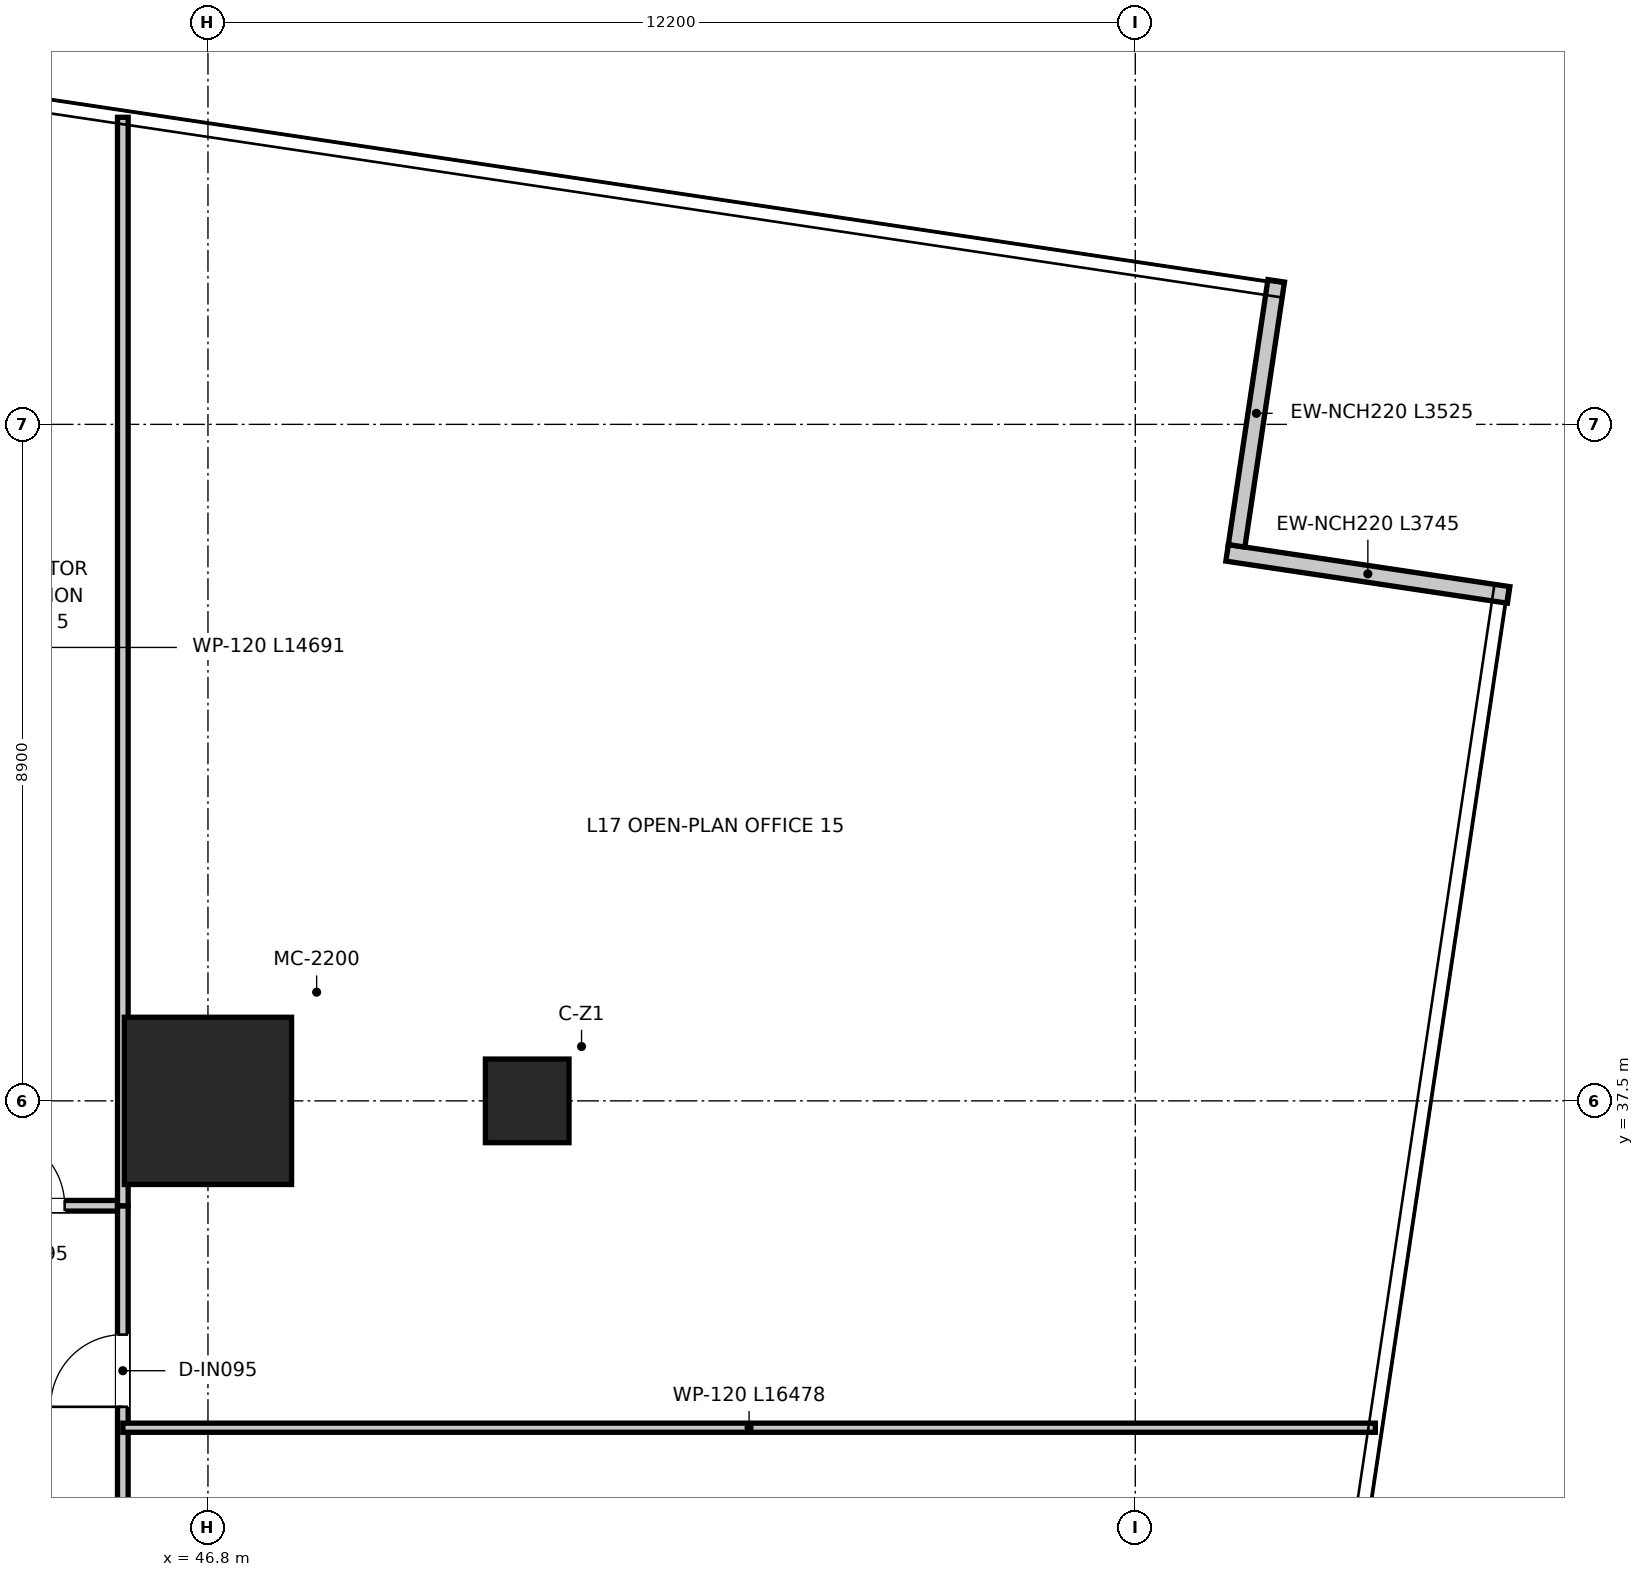
"""IFC4 building model, lengths in metres.
Left out: names, types, materials, properties, quantities, classifications, styles, units other than length and angle.
Written with IfcOpenShell. Run it as: python <this file> out.ifc"""

import sys

from ifc_helpers import new_model, si_unit, direction, frame, frame_2d, origin, origin_2d, place, context, subcontext, project, spatial, rectangle, extrude, source, transform, mapped, element, fill, save


model = new_model("IFC4")
c1 = context("Model", 3, precision=1e-05, world=origin(), true_north=direction((0.0, 1.0)))
c2 = subcontext(c1, "Body", "Model", "MODEL_VIEW")
j1 = project(units=[si_unit("LENGTHUNIT", "METRE"), si_unit("PLANEANGLEUNIT", "RADIAN")], contexts=[c1])
p1 = place(None, origin())
s1 = spatial("IfcSite", under=j1, at=p1, CompositionType="ELEMENT")
p2 = place(p1, origin())
s2 = spatial("IfcBuilding", under=s1, at=p2, CompositionType="ELEMENT")
p3 = place(p2, frame((0.0, 0.0, 72.4)))
s3 = spatial("IfcBuildingStorey", under=s2, at=p3, CompositionType="ELEMENT", Elevation=72.4)
m1 = source(origin(), c2, "Body", "SweptSolid", [
    extrude(rectangle(XDim=2.2, YDim=2.2, at=origin_2d()), origin(), (0.0, 0.0, 1.0), 3.95),
])
p4 = place(p3, frame((46.8, 37.5, 0.0), z_axis=(0.0, 0.0, 1.0), x_axis=(1.0, 0.0, 0.0)))
e1 = element("IfcColumn", 1, at=p4, inside=s3, PredefinedType="USERDEFINED", context=c2, shape_type="MappedRepresentation", body=[
    mapped(m1, transform((0.0, 0.0, 0.0), x_axis=(1.0, 0.0, 0.0), y_axis=(0.0, 1.0, 0.0), z_axis=(0.0, 0.0, 1.0), scale=1.0)),
])
m2 = source(origin(), c2, "Body", "SweptSolid", [
    extrude(rectangle(XDim=1.1, YDim=1.1, at=origin_2d()), origin(), (0.0, 0.0, 1.0), 3.95),
])
p5 = place(p3, frame((51.0, 37.5, 0.0), z_axis=(0.0, 0.0, 1.0), x_axis=(1.0, 0.0, 0.0)))
e2 = element("IfcColumn", 2, at=p5, inside=s3, PredefinedType="COLUMN", context=c2, shape_type="MappedRepresentation", body=[
    mapped(m2, transform((0.0, 0.0, 0.0), x_axis=(1.0, 0.0, 0.0), y_axis=(0.0, 1.0, 0.0), z_axis=(0.0, 0.0, 1.0), scale=1.0)),
])
p6 = place(p3, frame((63.912, 44.156, 0.0), z_axis=(0.0, 0.0, 1.0), x_axis=(-0.989009392913, 0.147852699435, 0.0)))
e3 = element("IfcWall", 3, at=p6, inside=s3, PredefinedType="ELEMENTEDWALL", context=c2, shape_type="SweptSolid", body=[
    extrude(rectangle(XDim=3.745, YDim=0.22, at=frame_2d((1.873, 0.0))), origin(), (0.0, 0.0, 1.0), 3.67),
])
p7 = place(p3, frame((60.333, 44.802, 0.0), z_axis=(0.0, 0.0, 1.0), x_axis=(0.147798551521, 0.98901748628, 0.0)))
e4 = element("IfcWall", 4, at=p7, inside=s3, PredefinedType="ELEMENTEDWALL", context=c2, shape_type="SweptSolid", body=[
    extrude(rectangle(XDim=3.525, YDim=0.22, at=frame_2d((1.763, 0.0))), origin(), (0.0, 0.0, 1.0), 3.67),
])
p8 = place(p3, frame((26.32, 36.12, 0.0), z_axis=(0.0, 0.0, 1.0), x_axis=(1.0, 0.0, 0.0)))
e5 = element("IfcWall", 5, at=p8, inside=s3, PredefinedType="PARTITIONING", context=c2, shape_type="SweptSolid", body=[
    extrude(rectangle(XDim=19.36, YDim=0.14, at=frame_2d((9.68, 0.0))), origin(), (0.0, 0.0, 1.0), 3.08),
])
p9 = place(p8, frame((1.265, 0.0, 0.0)))
e6 = element("IfcOpeningElement", 6, at=p9, cuts=e5, PredefinedType="OPENING", context=c2, shape_type="SweptSolid", body=[
    extrude(rectangle(XDim=0.95, YDim=2.1, at=frame_2d((0.475, 1.05))), frame((0.0, 0.08, 0.0), z_axis=(0.0, -1.0, 0.0), x_axis=(1.0, 0.0, 0.0)), (0.0, 0.0, 1.0), 0.16),
])
p10 = place(p8, frame((5.305, 0.0, 0.0)))
e7 = element("IfcOpeningElement", 7, at=p10, cuts=e5, PredefinedType="OPENING", context=c2, shape_type="SweptSolid", body=[
    extrude(rectangle(XDim=0.95, YDim=2.1, at=frame_2d((0.475, 1.05))), frame((0.0, 0.08, 0.0), z_axis=(0.0, -1.0, 0.0), x_axis=(1.0, 0.0, 0.0)), (0.0, 0.0, 1.0), 0.16),
])
p11 = place(p8, frame((9.905, 0.0, 0.0)))
e8 = element("IfcOpeningElement", 8, at=p11, cuts=e5, PredefinedType="OPENING", context=c2, shape_type="SweptSolid", body=[
    extrude(rectangle(XDim=0.95, YDim=2.1, at=frame_2d((0.475, 1.05))), frame((0.0, 0.08, 0.0), z_axis=(0.0, -1.0, 0.0), x_axis=(1.0, 0.0, 0.0)), (0.0, 0.0, 1.0), 0.16),
])
p12 = place(p8, frame((14.305, 0.0, 0.0)))
e9 = element("IfcOpeningElement", 9, at=p12, cuts=e5, PredefinedType="OPENING", context=c2, shape_type="SweptSolid", body=[
    extrude(rectangle(XDim=0.95, YDim=2.1, at=frame_2d((0.475, 1.05))), frame((0.0, 0.08, 0.0), z_axis=(0.0, -1.0, 0.0), x_axis=(1.0, 0.0, 0.0)), (0.0, 0.0, 1.0), 0.16),
])
p13 = place(p8, frame((17.645, 0.0, 0.0)))
e10 = element("IfcOpeningElement", 10, at=p13, cuts=e5, PredefinedType="OPENING", context=c2, shape_type="SweptSolid", body=[
    extrude(rectangle(XDim=0.95, YDim=2.1, at=frame_2d((0.475, 1.05))), frame((0.0, 0.08, 0.0), z_axis=(0.0, -1.0, 0.0), x_axis=(1.0, 0.0, 0.0)), (0.0, 0.0, 1.0), 0.16),
])
p14 = place(p3, frame((45.68, 10.5, 0.0), z_axis=(0.0, 0.0, 1.0), x_axis=(0.0, 1.0, 0.0)))
e11 = element("IfcWall", 11, at=p14, inside=s3, PredefinedType="PARTITIONING", context=c2, shape_type="SweptSolid", body=[
    extrude(rectangle(XDim=25.62, YDim=0.14, at=frame_2d((12.81, 0.0))), origin(), (0.0, 0.0, 1.0), 2.97),
])
p15 = place(p14, frame((7.775, 0.0, 0.0)))
e12 = element("IfcOpeningElement", 12, at=p15, cuts=e11, PredefinedType="OPENING", context=c2, shape_type="SweptSolid", body=[
    extrude(rectangle(XDim=0.95, YDim=2.1, at=frame_2d((0.475, 1.05))), frame((0.0, 0.08, 0.0), z_axis=(0.0, -1.0, 0.0), x_axis=(1.0, 0.0, 0.0)), (0.0, 0.0, 1.0), 0.16),
])
p16 = place(p14, frame((11.275, 0.0, 0.0)))
e13 = element("IfcOpeningElement", 13, at=p16, cuts=e11, PredefinedType="OPENING", context=c2, shape_type="SweptSolid", body=[
    extrude(rectangle(XDim=0.95, YDim=2.1, at=frame_2d((0.475, 1.05))), frame((0.0, 0.08, 0.0), z_axis=(0.0, -1.0, 0.0), x_axis=(1.0, 0.0, 0.0)), (0.0, 0.0, 1.0), 0.16),
])
p17 = place(p14, frame((15.775, 0.0, 0.0)))
e14 = element("IfcOpeningElement", 14, at=p17, cuts=e11, PredefinedType="OPENING", context=c2, shape_type="SweptSolid", body=[
    extrude(rectangle(XDim=0.95, YDim=2.1, at=frame_2d((0.475, 1.05))), frame((0.0, 0.08, 0.0), z_axis=(0.0, -1.0, 0.0), x_axis=(1.0, 0.0, 0.0)), (0.0, 0.0, 1.0), 0.16),
])
p18 = place(p14, frame((20.125, 0.0, 0.0)))
e15 = element("IfcOpeningElement", 15, at=p18, cuts=e11, PredefinedType="OPENING", context=c2, shape_type="SweptSolid", body=[
    extrude(rectangle(XDim=0.95, YDim=2.1, at=frame_2d((0.475, 1.05))), frame((0.0, 0.08, 0.0), z_axis=(0.0, -1.0, 0.0), x_axis=(1.0, 0.0, 0.0)), (0.0, 0.0, 1.0), 0.16),
])
p19 = place(p14, frame((22.975, 0.0, 0.0)))
e16 = element("IfcOpeningElement", 16, at=p19, cuts=e11, PredefinedType="OPENING", context=c2, shape_type="SweptSolid", body=[
    extrude(rectangle(XDim=0.95, YDim=2.1, at=frame_2d((0.475, 1.05))), frame((0.0, 0.08, 0.0), z_axis=(0.0, -1.0, 0.0), x_axis=(1.0, 0.0, 0.0)), (0.0, 0.0, 1.0), 0.16),
])
p20 = place(p3, frame((45.68, 36.12, 0.0), z_axis=(0.0, 0.0, 1.0), x_axis=(0.0, 1.0, 0.0)))
e17 = element("IfcWall", 17, at=p20, inside=s3, PredefinedType="PARTITIONING", context=c2, shape_type="SweptSolid", body=[
    extrude(rectangle(XDim=14.32, YDim=0.14, at=frame_2d((7.16, 0.0))), origin(), (0.0, 0.0, 1.0), 2.97),
])
p21 = place(p3, frame((45.68, 33.2, 0.0), z_axis=(0.0, 0.0, 1.0), x_axis=(1.0, 0.0, 0.0)))
e18 = element("IfcWall", 18, at=p21, inside=s3, PredefinedType="PARTITIONING", context=c2, shape_type="SweptSolid", body=[
    extrude(rectangle(XDim=16.478, YDim=0.12, at=frame_2d((8.239, 0.0))), origin(), (0.0, 0.0, 1.0), 2.97),
])
p22 = place(p13, origin())
e19 = element("IfcDoor", 19, at=p22, inside=s3, OperationType="SINGLE_SWING_LEFT", PredefinedType="DOOR", context=c2, shape_type="SweptSolid", body=[
    extrude(rectangle(XDim=0.95, YDim=2.1, at=frame_2d((0.475, 1.05))), frame((0.0, 0.025, 0.0), z_axis=(0.0, -1.0, 0.0), x_axis=(1.0, 0.0, 0.0)), (0.0, 0.0, 1.0), 0.05),
])
fill(e10, e19)
p23 = place(p19, origin())
e20 = element("IfcDoor", 20, at=p23, inside=s3, OperationType="SINGLE_SWING_LEFT", PredefinedType="DOOR", context=c2, shape_type="SweptSolid", body=[
    extrude(rectangle(XDim=0.95, YDim=2.1, at=frame_2d((0.475, 1.05))), frame((0.0, 0.025, 0.0), z_axis=(0.0, -1.0, 0.0), x_axis=(1.0, 0.0, 0.0)), (0.0, 0.0, 1.0), 0.05),
])
fill(e16, e20)
save(model, sys.argv[1])
